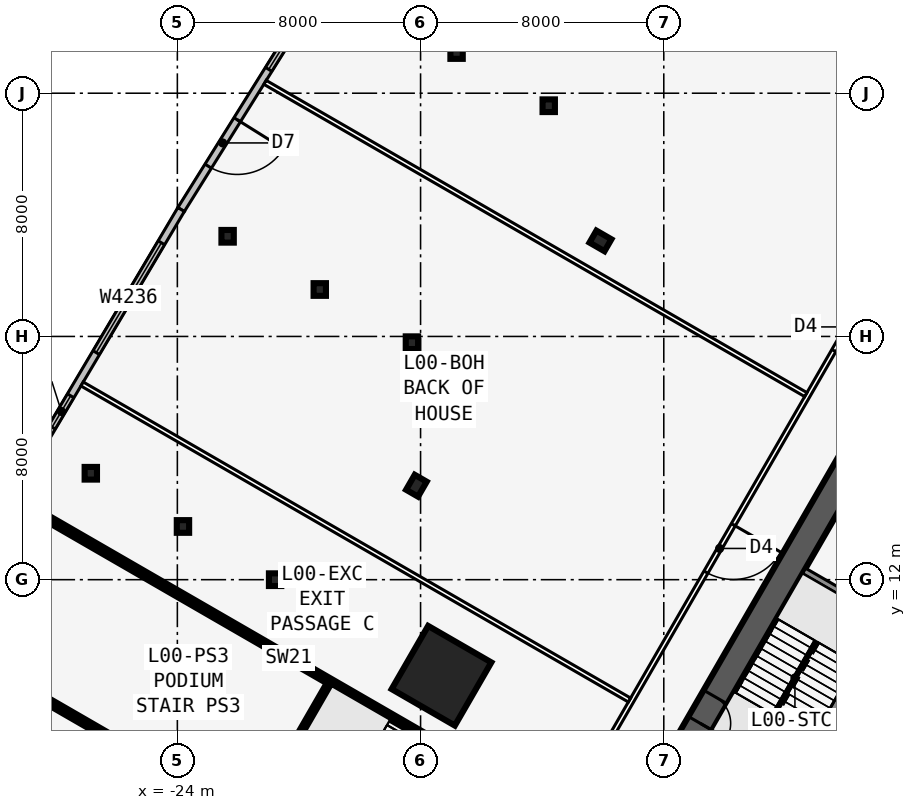
"""IFC4 building model, lengths in metres.
Left out: names, types, materials, properties, quantities, classifications, styles, units other than length and angle.
Written with IfcOpenShell. Run it as: python <this file> out.ifc"""

import sys

from ifc_helpers import new_model, si_unit, direction, frame, frame_2d, origin, origin_2d, place, context, subcontext, project, spatial, rectangle, i_section, extrude, element, fill, save


model = new_model("IFC4")
c1 = context("Model", 3, precision=1e-05, world=origin(), true_north=direction((0.0, 1.0)))
c2 = subcontext(c1, "Body", "Model", "MODEL_VIEW")
j1 = project(units=[si_unit("LENGTHUNIT", "METRE"), si_unit("PLANEANGLEUNIT", "RADIAN")], contexts=[c1])
p1 = place(None, origin())
s1 = spatial("IfcSite", under=j1, at=p1, CompositionType="ELEMENT")
p2 = place(p1, origin())
s2 = spatial("IfcBuilding", under=s1, at=p2, CompositionType="ELEMENT")
p3 = place(p2, origin())
s3 = spatial("IfcBuildingStorey", under=s2, at=p3, CompositionType="ELEMENT", Elevation=0.0)
p4 = place(p3, frame((0.0, 19.052, -0.3), z_axis=(0.0, 0.0, 1.0), x_axis=(-0.499999749417, -0.866025548458, 0.0)))
e1 = element("IfcWall", 1, at=p4, inside=s3, PredefinedType="SHEAR", context=c2, shape_type="SweptSolid", body=[
    extrude(rectangle(XDim=33.0, YDim=0.9, at=frame_2d((16.5, 0.0))), origin(), (0.0, 0.0, 1.0), 6.3),
])
p5 = place(p4, frame((14.15, 0.0, 0.3)))
e2 = element("IfcOpeningElement", 2, at=p5, cuts=e1, PredefinedType="OPENING", context=c2, shape_type="SweptSolid", body=[
    extrude(rectangle(XDim=1.8, YDim=2.13, at=frame_2d((0.9, 1.065))), frame((0.0, 0.46, 0.0), z_axis=(0.0, -1.0, 0.0), x_axis=(1.0, 0.0, 0.0)), (0.0, 0.0, 1.0), 0.92),
])
p6 = place(p4, frame((12.6, 0.0, 0.3)))
e3 = element("IfcOpeningElement", 3, at=p6, cuts=e1, PredefinedType="OPENING", context=c2, shape_type="SweptSolid", body=[
    extrude(rectangle(XDim=1.0, YDim=2.13, at=frame_2d((0.5, 1.065))), frame((0.0, 0.46, 0.0), z_axis=(0.0, -1.0, 0.0), x_axis=(1.0, 0.0, 0.0)), (0.0, 0.0, 1.0), 0.92),
])
p7 = place(p3, frame((-0.062, 11.794, -0.3), z_axis=(0.0, 0.0, 1.0), x_axis=(-0.500006680225, -0.86602154692, 0.0)))
e4 = element("IfcWall", 4, at=p7, inside=s3, PredefinedType="SOLIDWALL", context=c2, shape_type="SweptSolid", body=[
    extrude(rectangle(XDim=7.733, YDim=0.25, at=frame_2d((3.866, 0.0))), origin(), (0.0, 0.0, 1.0), 6.05),
])
p8 = place(p3, frame((-0.679, 10.727, -0.3), z_axis=(0.0, 0.0, 1.0), x_axis=(-0.866022959057, 0.500004234368, 0.0)))
e5 = element("IfcWall", 5, at=p8, inside=s3, PredefinedType="SOLIDWALL", context=c2, shape_type="SweptSolid", body=[
    extrude(rectangle(XDim=3.125, YDim=0.2, at=frame_2d((1.562, 0.0))), origin(), (0.0, 0.0, 1.0), 6.05),
])
for number, where, z_axis, x_axis in (
    (6, (-10.083, 23.142, -0.3), (0.0, 0.0, 1.0), (-0.5, -0.866, 0.0)),
    (7, (-16.137, 15.09, -0.3), (0.0, 0.0, 1.0), (-0.866, 0.5, 0.0)),
):
    element("IfcColumn", number, at=place(p3, frame(where, z_axis=z_axis, x_axis=x_axis)), inside=s3, PredefinedType="COLUMN", context=c2, shape_type="SweptSolid", body=[
        extrude(i_section(OverallWidth=0.455, OverallDepth=0.569, WebThickness=0.078, FlangeThickness=0.125, at=origin_2d()), origin(), (0.0, 0.0, 1.0), 6.3),
    ])
for number, where, z_axis, x_axis in (
    (8, (-11.785, 27.588, -0.3), (0.0, 0.0, 1.0), (1.0, 0.0, 0.0)),
    (9, (-16.285, 19.794, -0.3), (0.0, 0.0, 1.0), (1.0, 0.0, 0.0)),
    (10, (-20.785, 12.0, -0.3), (0.0, 0.0, 1.0), (1.0, 0.0, 0.0)),
    (11, (-14.816, 29.338, -0.3), (0.0, 0.0, 1.0), (1.0, 0.0, 0.0)),
    (12, (-19.316, 21.544, -0.3), (0.0, 0.0, 1.0), (1.0, 0.0, 0.0)),
    (13, (-23.816, 13.75, -0.3), (0.0, 0.0, 1.0), (1.0, 0.0, 0.0)),
    (14, (-22.347, 23.294, -0.3), (0.0, 0.0, 1.0), (1.0, 0.0, 0.0)),
    (15, (-26.847, 15.5, -0.3), (0.0, 0.0, 1.0), (1.0, 0.0, 0.0)),
):
    element("IfcColumn", number, at=place(p3, frame(where, z_axis=z_axis, x_axis=x_axis)), inside=s3, PredefinedType="COLUMN", context=c2, shape_type="SweptSolid", body=[
        extrude(i_section(OverallWidth=0.406, OverallDepth=0.417, WebThickness=0.03, FlangeThickness=0.048, at=origin_2d()), origin(), (0.0, 0.0, 1.0), 6.3),
    ])
p9 = place(p3, frame((-15.312, 8.84, -0.3), z_axis=(0.0, 0.0, 1.0), x_axis=(-0.866025403784, 0.5, 0.0)))
e16 = element("IfcColumn", 16, at=p9, inside=s3, PredefinedType="COLUMN", context=c2, shape_type="SweptSolid", body=[
    extrude(rectangle(XDim=2.4, YDim=2.4, at=origin_2d()), origin(), (0.0, 0.0, 1.0), 6.3),
])
p10 = place(p3, frame((-19.106, 31.81, -0.3), z_axis=(0.0, 0.0, 1.0), x_axis=(-0.529864906428, -0.848082060261, 0.0)))
e17 = element("IfcWall", 17, at=p10, inside=s3, PredefinedType="STANDARD", context=c2, shape_type="SweptSolid", body=[
    extrude(rectangle(XDim=9.006, YDim=0.25, at=frame_2d((4.503, 0.0))), origin(), (0.0, 0.0, 1.0), 6.05),
])
p11 = place(p10, frame((0.568, 0.0, 1.2)))
e18 = element("IfcOpeningElement", 18, at=p11, cuts=e17, PredefinedType="OPENING", context=c2, shape_type="SweptSolid", body=[
    extrude(rectangle(XDim=3.0, YDim=3.6, at=frame_2d((1.5, 1.8))), frame((0.0, 0.135, 0.0), z_axis=(0.0, -1.0, 0.0), x_axis=(1.0, 0.0, 0.0)), (0.0, 0.0, 1.0), 0.27),
])
p12 = place(p10, frame((5.521, 0.0, 0.3)))
e19 = element("IfcOpeningElement", 19, at=p12, cuts=e17, PredefinedType="OPENING", context=c2, shape_type="SweptSolid", body=[
    extrude(rectangle(XDim=1.8, YDim=2.7, at=frame_2d((0.9, 1.35))), frame((0.0, 0.135, 0.0), z_axis=(0.0, -1.0, 0.0), x_axis=(1.0, 0.0, 0.0)), (0.0, 0.0, 1.0), 0.27),
])
p13 = place(p3, frame((-23.876, 24.175, -0.3), z_axis=(0.0, 0.0, 1.0), x_axis=(-0.510009078305, -0.860169018302, 0.0)))
e20 = element("IfcWall", 20, at=p13, inside=s3, PredefinedType="STANDARD", context=c2, shape_type="SweptSolid", body=[
    extrude(rectangle(XDim=9.0, YDim=0.25, at=frame_2d((4.5, 0.0))), origin(), (0.0, 0.0, 1.0), 6.05),
])
p14 = place(p13, frame((1.273, 0.0, 1.2)))
e21 = element("IfcOpeningElement", 21, at=p14, cuts=e20, PredefinedType="OPENING", context=c2, shape_type="SweptSolid", body=[
    extrude(rectangle(XDim=4.2, YDim=3.6, at=frame_2d((2.1, 1.8))), frame((0.0, 0.135, 0.0), z_axis=(0.0, -1.0, 0.0), x_axis=(1.0, 0.0, 0.0)), (0.0, 0.0, 1.0), 0.27),
])
p15 = place(p13, frame((7.123, 0.0, 1.2)))
e22 = element("IfcOpeningElement", 22, at=p15, cuts=e20, PredefinedType="OPENING", context=c2, shape_type="SweptSolid", body=[
    extrude(rectangle(XDim=1.2, YDim=3.6, at=frame_2d((0.6, 1.8))), frame((0.0, 0.135, 0.0), z_axis=(0.0, -1.0, 0.0), x_axis=(1.0, 0.0, 0.0)), (0.0, 0.0, 1.0), 0.27),
])
p16 = place(p3, frame((-0.5, 22.836, -0.3), z_axis=(0.0, 0.0, 1.0), x_axis=(-0.500001677587, -0.866024435227, 0.0)))
e23 = element("IfcWall", 23, at=p16, inside=s3, PredefinedType="PARTITIONING", context=c2, shape_type="SweptSolid", body=[
    extrude(rectangle(XDim=39.054, YDim=0.15, at=frame_2d((19.527, 0.0))), origin(), (0.0, 0.0, 1.0), 5.108),
])
p17 = place(p16, frame((2.013, 0.0, 0.3)))
e24 = element("IfcOpeningElement", 24, at=p17, cuts=e23, PredefinedType="OPENING", context=c2, shape_type="SweptSolid", body=[
    extrude(rectangle(XDim=1.8, YDim=2.13, at=frame_2d((0.9, 1.065))), frame((0.0, 0.085, 0.0), z_axis=(0.0, -1.0, 0.0), x_axis=(1.0, 0.0, 0.0)), (0.0, 0.0, 1.0), 0.17),
])
p18 = place(p16, frame((10.427, 0.0, 0.3)))
e25 = element("IfcOpeningElement", 25, at=p18, cuts=e23, PredefinedType="OPENING", context=c2, shape_type="SweptSolid", body=[
    extrude(rectangle(XDim=1.8, YDim=2.13, at=frame_2d((0.9, 1.065))), frame((0.0, 0.085, 0.0), z_axis=(0.0, -1.0, 0.0), x_axis=(1.0, 0.0, 0.0)), (0.0, 0.0, 1.0), 0.17),
])
p19 = place(p16, frame((18.427, 0.0, 0.3)))
e26 = element("IfcOpeningElement", 26, at=p19, cuts=e23, PredefinedType="OPENING", context=c2, shape_type="SweptSolid", body=[
    extrude(rectangle(XDim=1.8, YDim=2.13, at=frame_2d((0.9, 1.065))), frame((0.0, 0.085, 0.0), z_axis=(0.0, -1.0, 0.0), x_axis=(1.0, 0.0, 0.0)), (0.0, 0.0, 1.0), 0.17),
])
p20 = place(p16, frame((23.227, 0.0, 0.3)))
e27 = element("IfcOpeningElement", 27, at=p20, cuts=e23, PredefinedType="OPENING", context=c2, shape_type="SweptSolid", body=[
    extrude(rectangle(XDim=1.8, YDim=2.13, at=frame_2d((0.9, 1.065))), frame((0.0, 0.085, 0.0), z_axis=(0.0, -1.0, 0.0), x_axis=(1.0, 0.0, 0.0)), (0.0, 0.0, 1.0), 0.17),
])
p21 = place(p16, frame((27.627, 0.0, 0.3)))
e28 = element("IfcOpeningElement", 28, at=p21, cuts=e23, PredefinedType="OPENING", context=c2, shape_type="SweptSolid", body=[
    extrude(rectangle(XDim=1.0, YDim=2.13, at=frame_2d((0.5, 1.065))), frame((0.0, 0.085, 0.0), z_axis=(0.0, -1.0, 0.0), x_axis=(1.0, 0.0, 0.0)), (0.0, 0.0, 1.0), 0.17),
])
p22 = place(p16, frame((30.277, 0.0, 0.3)))
e29 = element("IfcOpeningElement", 29, at=p22, cuts=e23, PredefinedType="OPENING", context=c2, shape_type="SweptSolid", body=[
    extrude(rectangle(XDim=1.0, YDim=2.13, at=frame_2d((0.5, 1.065))), frame((0.0, 0.085, 0.0), z_axis=(0.0, -1.0, 0.0), x_axis=(1.0, 0.0, 0.0)), (0.0, 0.0, 1.0), 0.17),
])
p23 = place(p16, frame((34.89, 0.0, 0.3)))
e30 = element("IfcOpeningElement", 30, at=p23, cuts=e23, PredefinedType="OPENING", context=c2, shape_type="SweptSolid", body=[
    extrude(rectangle(XDim=1.0, YDim=2.13, at=frame_2d((0.5, 1.065))), frame((0.0, 0.085, 0.0), z_axis=(0.0, -1.0, 0.0), x_axis=(1.0, 0.0, 0.0)), (0.0, 0.0, 1.0), 0.17),
])
p24 = place(p3, frame((-3.329, 18.087, -0.3), z_axis=(0.0, 0.0, 1.0), x_axis=(-0.866020300771, 0.500008838574, 0.0)))
e31 = element("IfcWall", 31, at=p24, inside=s3, PredefinedType="PARTITIONING", context=c2, shape_type="SweptSolid", body=[
    extrude(rectangle(XDim=20.539, YDim=0.15, at=frame_2d((10.27, 0.0))), origin(), (0.0, 0.0, 1.0), 6.05),
])
p25 = place(p3, frame((-9.128, 8.042, -0.3), z_axis=(0.0, 0.0, 1.0), x_axis=(-0.866022493458, 0.5000050408, 0.0)))
e32 = element("IfcWall", 32, at=p25, inside=s3, PredefinedType="PARTITIONING", context=c2, shape_type="SweptSolid", body=[
    extrude(rectangle(XDim=20.79, YDim=0.15, at=frame_2d((10.395, 0.0))), origin(), (0.0, 0.0, 1.0), 6.05),
])
p26 = place(p3, frame((-11.329, 4.231, -0.3), z_axis=(0.0, 0.0, 1.0), x_axis=(-0.866025850686, 0.499999225942, 0.0)))
e33 = element("IfcWall", 33, at=p26, inside=s3, PredefinedType="SHEAR", context=c2, shape_type="SweptSolid", body=[
    extrude(rectangle(XDim=20.794, YDim=0.2, at=frame_2d((10.397, 0.0))), origin(), (0.0, 0.0, 1.0), 6.3),
])
p27 = place(p3, frame((-13.928, -0.272, -0.3), z_axis=(0.0, 0.0, 1.0), x_axis=(-0.866025976348, 0.499999008289, 0.0)))
e34 = element("IfcWall", 34, at=p27, inside=s3, PredefinedType="SHEAR", context=c2, shape_type="SweptSolid", body=[
    extrude(rectangle(XDim=20.734, YDim=0.2, at=frame_2d((10.367, 0.0))), origin(), (0.0, 0.0, 1.0), 6.3),
])
p28 = place(p3, frame((-15.329, -2.697, -0.3), z_axis=(0.0, 0.0, 1.0), x_axis=(-0.866026526444, 0.499998055492, 0.0)))
e35 = element("IfcWall", 35, at=p28, inside=s3, PredefinedType="PARTITIONING", context=c2, shape_type="SweptSolid", body=[
    extrude(rectangle(XDim=20.678, YDim=0.15, at=frame_2d((10.339, 0.0))), origin(), (0.0, 0.0, 1.0), 5.108),
])
p29 = place(p3, frame((-2.988, 9.978, 0.0), z_axis=(0.0, 0.0, 1.0), x_axis=(-0.499992232847, -0.866029888106, 0.0)))
e36 = element("IfcWall", 36, at=p29, inside=s3, PredefinedType="SOLIDWALL", context=c2, shape_type="SweptSolid", body=[
    extrude(rectangle(XDim=2.794, YDim=0.1, at=frame_2d((1.397, 0.0))), origin(), (0.0, 0.0, 1.0), 6.0),
])
p30 = place(p3, frame((-18.949, 8.631, -0.3), z_axis=(0.0, 0.0, 1.0), x_axis=(-0.500006934395, -0.866021400173, 0.0)))
e37 = element("IfcWall", 37, at=p30, inside=s3, PredefinedType="SHEAR", context=c2, shape_type="SweptSolid", body=[
    extrude(rectangle(XDim=5.2, YDim=0.2, at=frame_2d((2.6, 0.0))), origin(), (0.0, 0.0, 1.0), 6.3),
])
p31 = place(p11, origin())
e38 = element("IfcWindow", 38, at=p31, inside=s3, PartitioningType="SINGLE_PANEL", PredefinedType="WINDOW", context=c2, shape_type="SweptSolid", body=[
    extrude(rectangle(XDim=3.0, YDim=3.6, at=frame_2d((1.5, 1.8))), frame((0.0, 0.03, 0.0), z_axis=(0.0, -1.0, 0.0), x_axis=(1.0, 0.0, 0.0)), (0.0, 0.0, 1.0), 0.06),
])
fill(e18, e38)
p32 = place(p12, origin())
e39 = element("IfcDoor", 39, at=p32, inside=s3, OperationType="DOUBLE_DOOR_SINGLE_SWING", PredefinedType="DOOR", context=c2, shape_type="SweptSolid", body=[
    extrude(rectangle(XDim=1.8, YDim=2.7, at=frame_2d((0.9, 1.35))), frame((0.0, 0.025, 0.0), z_axis=(0.0, -1.0, 0.0), x_axis=(1.0, 0.0, 0.0)), (0.0, 0.0, 1.0), 0.05),
])
fill(e19, e39)
p33 = place(p14, origin())
e40 = element("IfcWindow", 40, at=p33, inside=s3, PartitioningType="SINGLE_PANEL", PredefinedType="WINDOW", context=c2, shape_type="SweptSolid", body=[
    extrude(rectangle(XDim=4.2, YDim=3.6, at=frame_2d((2.1, 1.8))), frame((0.0, 0.03, 0.0), z_axis=(0.0, -1.0, 0.0), x_axis=(1.0, 0.0, 0.0)), (0.0, 0.0, 1.0), 0.06),
])
fill(e21, e40)
p34 = place(p15, origin())
e41 = element("IfcWindow", 41, at=p34, inside=s3, PartitioningType="SINGLE_PANEL", PredefinedType="WINDOW", context=c2, shape_type="SweptSolid", body=[
    extrude(rectangle(XDim=1.2, YDim=3.6, at=frame_2d((0.6, 1.8))), frame((0.0, 0.03, 0.0), z_axis=(0.0, -1.0, 0.0), x_axis=(1.0, 0.0, 0.0)), (0.0, 0.0, 1.0), 0.06),
])
fill(e22, e41)
p35 = place(p17, origin())
e42 = element("IfcDoor", 42, at=p35, inside=s3, OperationType="DOUBLE_DOOR_SINGLE_SWING", PredefinedType="DOOR", context=c2, shape_type="SweptSolid", body=[
    extrude(rectangle(XDim=1.8, YDim=2.13, at=frame_2d((0.9, 1.065))), frame((0.0, 0.025, 0.0), z_axis=(0.0, -1.0, 0.0), x_axis=(1.0, 0.0, 0.0)), (0.0, 0.0, 1.0), 0.05),
])
fill(e24, e42)
p36 = place(p18, origin())
e43 = element("IfcDoor", 43, at=p36, inside=s3, OperationType="DOUBLE_DOOR_SINGLE_SWING", PredefinedType="DOOR", context=c2, shape_type="SweptSolid", body=[
    extrude(rectangle(XDim=1.8, YDim=2.13, at=frame_2d((0.9, 1.065))), frame((0.0, 0.025, 0.0), z_axis=(0.0, -1.0, 0.0), x_axis=(1.0, 0.0, 0.0)), (0.0, 0.0, 1.0), 0.05),
])
fill(e25, e43)
p37 = place(p6, origin())
e44 = element("IfcDoor", 44, at=p37, inside=s3, OperationType="SINGLE_SWING_RIGHT", PredefinedType="DOOR", context=c2, shape_type="SweptSolid", body=[
    extrude(rectangle(XDim=1.0, YDim=2.13, at=frame_2d((0.5, 1.065))), frame((0.0, 0.025, 0.0), z_axis=(0.0, -1.0, 0.0), x_axis=(1.0, 0.0, 0.0)), (0.0, 0.0, 1.0), 0.05),
])
fill(e3, e44)
save(model, sys.argv[1])
